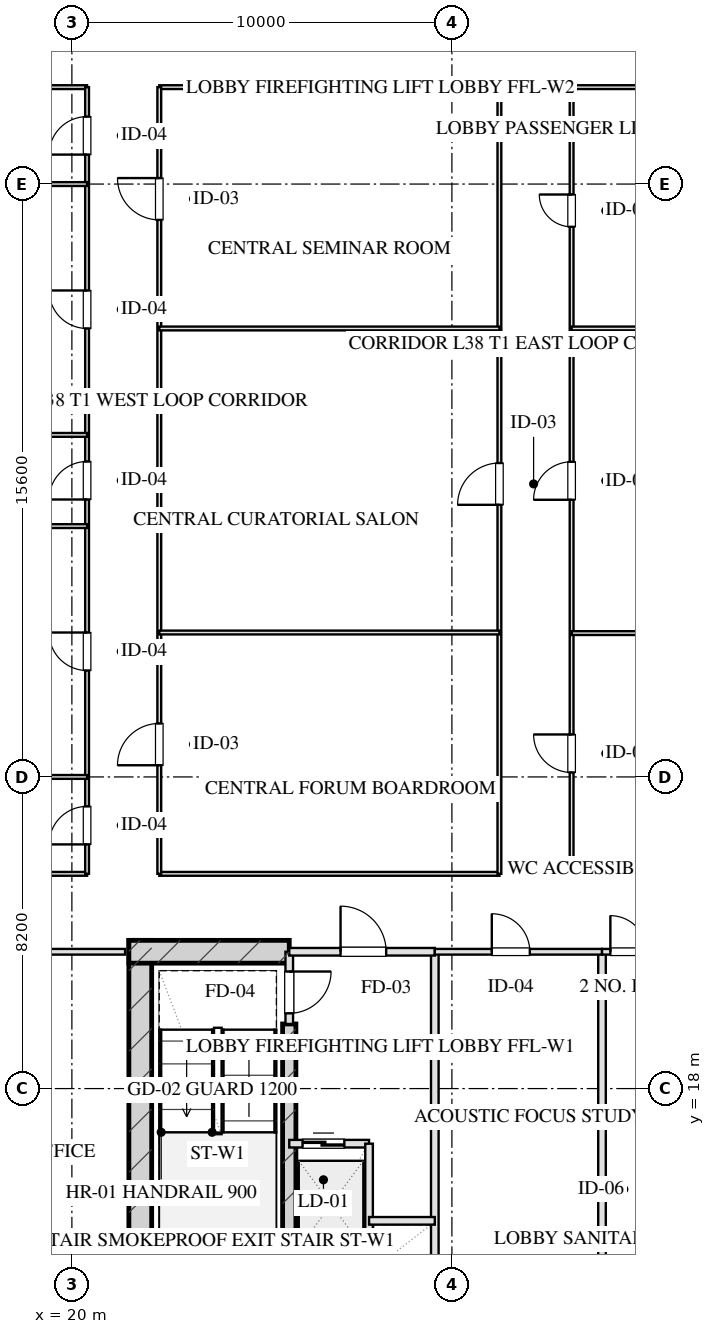
"""IFC4 building model, lengths in metres.
Left out: names, types, materials, properties, quantities, classifications, styles, units other than length and angle.
Written with IfcOpenShell. Run it as: python <this file> out.ifc"""

import sys

from ifc_helpers import new_model, si_unit, direction, frame, frame_2d, origin, place, context, subcontext, project, spatial, rectangle, extrude, element, fill, save


model = new_model("IFC4")
c1 = context("Model", 3, precision=1e-05, world=origin(), true_north=direction((0.0, 1.0)))
c2 = subcontext(c1, "Body", "Model", "MODEL_VIEW")
j1 = project(units=[si_unit("LENGTHUNIT", "METRE"), si_unit("PLANEANGLEUNIT", "RADIAN")], contexts=[c1])
p1 = place(None, origin())
s1 = spatial("IfcSite", under=j1, at=p1, CompositionType="ELEMENT")
p2 = place(p1, origin())
s2 = spatial("IfcBuilding", under=s1, at=p2, CompositionType="ELEMENT")
p3 = place(p2, frame((0.0, 0.0, 146.05)))
s3 = spatial("IfcBuildingStorey", under=s2, at=p3, CompositionType="ELEMENT", Elevation=146.05)
p4 = place(p3, frame((21.8, 21.9, 0.0), z_axis=(0.0, 0.0, 1.0), x_axis=(0.0, -1.0, 0.0)))
e1 = element("IfcWall", 1, at=p4, inside=s3, PredefinedType="SHEAR", context=c2, shape_type="SweptSolid", body=[
    extrude(rectangle(XDim=9.48, YDim=0.6, at=frame_2d((4.74, 0.0))), origin(), (0.0, 0.0, 1.0), 3.45),
])
p5 = place(p3, frame((25.72, 19.7, 0.0), z_axis=(0.0, 0.0, 1.0), x_axis=(0.0, -1.0, 0.0)))
e2 = element("IfcWall", 2, at=p5, inside=s3, PredefinedType="SHEAR", context=c2, shape_type="SweptSolid", body=[
    extrude(rectangle(XDim=6.98, YDim=0.35, at=frame_2d((3.49, 0.0))), origin(), (0.0, 0.0, 1.0), 3.45),
])
p6 = place(p3, frame((21.5, 21.6, 0.0), z_axis=(0.0, 0.0, 1.0), x_axis=(1.0, 0.0, 0.0)))
e3 = element("IfcWall", 3, at=p6, inside=s3, PredefinedType="SHEAR", context=c2, shape_type="SweptSolid", body=[
    extrude(rectangle(XDim=4.22, YDim=0.6, at=frame_2d((2.11, 0.0))), origin(), (0.0, 0.0, 1.0), 3.45),
])
p7 = place(p3, frame((25.72, 21.6, 0.0), z_axis=(0.0, 0.0, 1.0), x_axis=(0.0, -1.0, 0.0)))
e4 = element("IfcWall", 4, at=p7, inside=s3, PredefinedType="PARTITIONING", context=c2, shape_type="SweptSolid", body=[
    extrude(rectangle(XDim=1.9, YDim=0.2, at=frame_2d((0.95, 0.0))), origin(), (0.0, 0.0, 1.0), 3.175),
])
p8 = place(p7, frame((0.52, 0.0, 0.0)))
e5 = element("IfcOpeningElement", 5, at=p8, cuts=e4, PredefinedType="OPENING", context=c2, shape_type="SweptSolid", body=[
    extrude(rectangle(XDim=1.1, YDim=2.05, at=frame_2d((0.55, 1.025))), frame((0.0, 0.11, 0.0), z_axis=(0.0, -1.0, 0.0), x_axis=(1.0, 0.0, 0.0)), (0.0, 0.0, 1.0), 0.22),
])
p9 = place(p3, frame((29.55, 21.6, 0.0), z_axis=(0.0, 0.0, 1.0), x_axis=(0.0, -1.0, 0.0)))
e6 = element("IfcWall", 6, at=p9, inside=s3, PredefinedType="PARTITIONING", context=c2, shape_type="SweptSolid", body=[
    extrude(rectangle(XDim=8.43, YDim=0.2, at=frame_2d((4.215, 0.0))), origin(), (0.0, 0.0, 1.0), 3.175),
])
p10 = place(p3, frame((25.72, 21.6, 0.0), z_axis=(0.0, 0.0, 1.0), x_axis=(1.0, 0.0, 0.0)))
e7 = element("IfcWall", 7, at=p10, inside=s3, PredefinedType="PARTITIONING", context=c2, shape_type="SweptSolid", body=[
    extrude(rectangle(XDim=3.83, YDim=0.2, at=frame_2d((1.915, 0.0))), origin(), (0.0, 0.0, 1.0), 3.175),
])
p11 = place(p10, frame((1.35, 0.0, 0.0)))
e8 = element("IfcOpeningElement", 8, at=p11, cuts=e7, PredefinedType="OPENING", context=c2, shape_type="SweptSolid", body=[
    extrude(rectangle(XDim=1.2, YDim=2.05, at=frame_2d((0.6, 1.025))), frame((0.0, 0.11, 0.0), z_axis=(0.0, -1.0, 0.0), x_axis=(1.0, 0.0, 0.0)), (0.0, 0.0, 1.0), 0.22),
])
p12 = place(p3, frame((25.72, 16.55, 0.0), z_axis=(0.0, 0.0, 1.0), x_axis=(1.0, 0.0, 0.0)))
e9 = element("IfcWall", 9, at=p12, inside=s3, PredefinedType="PARTITIONING", context=c2, shape_type="SweptSolid", body=[
    extrude(rectangle(XDim=2.1, YDim=0.2, at=frame_2d((1.05, 0.0))), origin(), (0.0, 0.0, 1.0), 3.175),
])
p13 = place(p12, frame((0.35, 0.0, 0.0)))
e10 = element("IfcOpeningElement", 10, at=p13, cuts=e9, PredefinedType="OPENING", context=c2, shape_type="SweptSolid", body=[
    extrude(rectangle(XDim=1.1, YDim=2.05, at=frame_2d((0.55, 1.025))), frame((0.0, 0.11, 0.0), z_axis=(0.0, -1.0, 0.0), x_axis=(1.0, 0.0, 0.0)), (0.0, 0.0, 1.0), 0.22),
])
p14 = place(p3, frame((27.82, 16.55, 0.0), z_axis=(0.0, 0.0, 1.0), x_axis=(0.0, -1.0, 0.0)))
e11 = element("IfcWall", 11, at=p14, inside=s3, PredefinedType="PARTITIONING", context=c2, shape_type="SweptSolid", body=[
    extrude(rectangle(XDim=3.7, YDim=0.2, at=frame_2d((1.85, 0.0))), origin(), (0.0, 0.0, 1.0), 3.175),
])
p15 = place(p3, frame((27.82, 14.52, 0.0), z_axis=(0.0, 0.0, 1.0), x_axis=(1.0, 0.0, 0.0)))
e12 = element("IfcWall", 12, at=p15, inside=s3, PredefinedType="PARTITIONING", context=c2, shape_type="SweptSolid", body=[
    extrude(rectangle(XDim=1.73, YDim=0.2, at=frame_2d((0.865, 0.0))), origin(), (0.0, 0.0, 1.0), 3.175),
])
p16 = place(p3, frame((33.95, 21.6, 0.0), z_axis=(0.0, 0.0, 1.0), x_axis=(0.0, -1.0, 0.0)))
e13 = element("IfcWall", 13, at=p16, inside=s3, PredefinedType="PARTITIONING", context=c2, shape_type="SweptSolid", body=[
    extrude(rectangle(XDim=8.43, YDim=0.2, at=frame_2d((4.215, 0.0))), origin(), (0.0, 0.0, 1.0), 3.175),
])
p17 = place(p3, frame((29.55, 21.6, 0.0), z_axis=(0.0, 0.0, 1.0), x_axis=(1.0, 0.0, 0.0)))
e14 = element("IfcWall", 14, at=p17, inside=s3, PredefinedType="PARTITIONING", context=c2, shape_type="SweptSolid", body=[
    extrude(rectangle(XDim=4.4, YDim=0.15, at=frame_2d((2.2, 0.0))), origin(), (0.0, 0.0, 1.0), 3.175),
])
p18 = place(p17, frame((1.5, 0.0, 0.0)))
e15 = element("IfcOpeningElement", 15, at=p18, cuts=e14, PredefinedType="OPENING", context=c2, shape_type="SweptSolid", body=[
    extrude(rectangle(XDim=1.0, YDim=2.05, at=frame_2d((0.5, 1.025))), frame((0.0, 0.085, 0.0), z_axis=(0.0, -1.0, 0.0), x_axis=(1.0, 0.0, 0.0)), (0.0, 0.0, 1.0), 0.17),
])
p19 = place(p3, frame((29.55, 17.3, 0.0), z_axis=(0.0, 0.0, 1.0), x_axis=(1.0, 0.0, 0.0)))
e16 = element("IfcWall", 16, at=p19, inside=s3, PredefinedType="PARTITIONING", context=c2, shape_type="SweptSolid", body=[
    extrude(rectangle(XDim=4.4, YDim=0.15, at=frame_2d((2.2, 0.0))), origin(), (0.0, 0.0, 1.0), 3.175),
])
p20 = place(p3, frame((33.95, 21.6, 0.0), z_axis=(0.0, 0.0, 1.0), x_axis=(1.0, 0.0, 0.0)))
e17 = element("IfcWall", 17, at=p20, inside=s3, PredefinedType="PARTITIONING", context=c2, shape_type="SweptSolid", body=[
    extrude(rectangle(XDim=3.8, YDim=0.15, at=frame_2d((1.9, 0.0))), origin(), (0.0, 0.0, 1.0), 3.175),
])
p21 = place(p20, frame((0.22, 0.0, 0.0)))
e18 = element("IfcOpeningElement", 18, at=p21, cuts=e17, PredefinedType="OPENING", context=c2, shape_type="SweptSolid", body=[
    extrude(rectangle(XDim=0.95, YDim=2.05, at=frame_2d((0.475, 1.025))), frame((0.0, 0.085, 0.0), z_axis=(0.0, -1.0, 0.0), x_axis=(1.0, 0.0, 0.0)), (0.0, 0.0, 1.0), 0.17),
])
p22 = place(p3, frame((11.4, 21.6, 0.0), z_axis=(0.0, 0.0, 1.0), x_axis=(1.0, 0.0, 0.0)))
e19 = element("IfcWall", 19, at=p22, inside=s3, PredefinedType="PARTITIONING", context=c2, shape_type="SweptSolid", body=[
    extrude(rectangle(XDim=10.0, YDim=0.15, at=frame_2d((5.0, 0.0))), origin(), (0.0, 0.0, 1.0), 3.175),
])
p23 = place(p22, frame((4.2, 0.0, 0.0)))
e20 = element("IfcOpeningElement", 20, at=p23, cuts=e19, PredefinedType="OPENING", context=c2, shape_type="SweptSolid", body=[
    extrude(rectangle(XDim=1.0, YDim=2.05, at=frame_2d((0.5, 1.025))), frame((0.0, 0.085, 0.0), z_axis=(0.0, -1.0, 0.0), x_axis=(1.0, 0.0, 0.0)), (0.0, 0.0, 1.0), 0.17),
])
p24 = place(p3, frame((11.4, 23.65, 0.0), z_axis=(0.0, 0.0, 1.0), x_axis=(1.0, 0.0, 0.0)))
e21 = element("IfcWall", 21, at=p24, inside=s3, PredefinedType="MOVABLE", context=c2, shape_type="SweptSolid", body=[
    extrude(rectangle(XDim=9.0, YDim=0.1, at=frame_2d((4.5, 0.0))), origin(), (0.0, 0.0, 1.0), 3.175),
])
p25 = place(p3, frame((22.3, 23.65, 0.0), z_axis=(0.0, 0.0, 1.0), x_axis=(1.0, 0.0, 0.0)))
e22 = element("IfcWall", 22, at=p25, inside=s3, PredefinedType="MOVABLE", context=c2, shape_type="SweptSolid", body=[
    extrude(rectangle(XDim=8.95, YDim=0.1, at=frame_2d((4.475, 0.0))), origin(), (0.0, 0.0, 1.0), 3.175),
])
p26 = place(p3, frame((33.15, 23.65, 0.0), z_axis=(0.0, 0.0, 1.0), x_axis=(1.0, 0.0, 0.0)))
e23 = element("IfcWall", 23, at=p26, inside=s3, PredefinedType="MOVABLE", context=c2, shape_type="SweptSolid", body=[
    extrude(rectangle(XDim=15.45, YDim=0.1, at=frame_2d((7.725, 0.0))), origin(), (0.0, 0.0, 1.0), 3.175),
])
p27 = place(p3, frame((11.4, 44.35, 0.0), z_axis=(0.0, 0.0, 1.0), x_axis=(1.0, 0.0, 0.0)))
e24 = element("IfcWall", 24, at=p27, inside=s3, PredefinedType="MOVABLE", context=c2, shape_type="SweptSolid", body=[
    extrude(rectangle(XDim=9.0, YDim=0.1, at=frame_2d((4.5, 0.0))), origin(), (0.0, 0.0, 1.0), 3.175),
])
p28 = place(p3, frame((22.3, 44.35, 0.0), z_axis=(0.0, 0.0, 1.0), x_axis=(1.0, 0.0, 0.0)))
e25 = element("IfcWall", 25, at=p28, inside=s3, PredefinedType="MOVABLE", context=c2, shape_type="SweptSolid", body=[
    extrude(rectangle(XDim=8.95, YDim=0.1, at=frame_2d((4.475, 0.0))), origin(), (0.0, 0.0, 1.0), 3.175),
])
p29 = place(p3, frame((33.15, 44.35, 0.0), z_axis=(0.0, 0.0, 1.0), x_axis=(1.0, 0.0, 0.0)))
e26 = element("IfcWall", 26, at=p29, inside=s3, PredefinedType="MOVABLE", context=c2, shape_type="SweptSolid", body=[
    extrude(rectangle(XDim=15.45, YDim=0.1, at=frame_2d((7.725, 0.0))), origin(), (0.0, 0.0, 1.0), 3.175),
])
p30 = place(p3, frame((20.4, 23.65, 0.0), z_axis=(0.0, 0.0, 1.0), x_axis=(0.0, 1.0, 0.0)))
e27 = element("IfcWall", 27, at=p30, inside=s3, PredefinedType="MOVABLE", context=c2, shape_type="SweptSolid", body=[
    extrude(rectangle(XDim=20.7, YDim=0.1, at=frame_2d((10.35, 0.0))), origin(), (0.0, 0.0, 1.0), 3.175),
])
p31 = place(p30, frame((0.775, 0.0, 0.0)))
e28 = element("IfcOpeningElement", 28, at=p31, cuts=e27, PredefinedType="OPENING", context=c2, shape_type="SweptSolid", body=[
    extrude(rectangle(XDim=1.0, YDim=2.05, at=frame_2d((0.5, 1.025))), frame((0.0, 0.06, 0.0), z_axis=(0.0, -1.0, 0.0), x_axis=(1.0, 0.0, 0.0)), (0.0, 0.0, 1.0), 0.12),
])
p32 = place(p30, frame((5.35, 0.0, 0.0)))
e29 = element("IfcOpeningElement", 29, at=p32, cuts=e27, PredefinedType="OPENING", context=c2, shape_type="SweptSolid", body=[
    extrude(rectangle(XDim=1.0, YDim=2.05, at=frame_2d((0.5, 1.025))), frame((0.0, 0.06, 0.0), z_axis=(0.0, -1.0, 0.0), x_axis=(1.0, 0.0, 0.0)), (0.0, 0.0, 1.0), 0.12),
])
p33 = place(p30, frame((9.85, 0.0, 0.0)))
e30 = element("IfcOpeningElement", 30, at=p33, cuts=e27, PredefinedType="OPENING", context=c2, shape_type="SweptSolid", body=[
    extrude(rectangle(XDim=1.0, YDim=2.05, at=frame_2d((0.5, 1.025))), frame((0.0, 0.06, 0.0), z_axis=(0.0, -1.0, 0.0), x_axis=(1.0, 0.0, 0.0)), (0.0, 0.0, 1.0), 0.12),
])
p34 = place(p30, frame((14.35, 0.0, 0.0)))
e31 = element("IfcOpeningElement", 31, at=p34, cuts=e27, PredefinedType="OPENING", context=c2, shape_type="SweptSolid", body=[
    extrude(rectangle(XDim=1.0, YDim=2.05, at=frame_2d((0.5, 1.025))), frame((0.0, 0.06, 0.0), z_axis=(0.0, -1.0, 0.0), x_axis=(1.0, 0.0, 0.0)), (0.0, 0.0, 1.0), 0.12),
])
p35 = place(p30, frame((18.925, 0.0, 0.0)))
e32 = element("IfcOpeningElement", 32, at=p35, cuts=e27, PredefinedType="OPENING", context=c2, shape_type="SweptSolid", body=[
    extrude(rectangle(XDim=1.0, YDim=2.05, at=frame_2d((0.5, 1.025))), frame((0.0, 0.06, 0.0), z_axis=(0.0, -1.0, 0.0), x_axis=(1.0, 0.0, 0.0)), (0.0, 0.0, 1.0), 0.12),
])
p36 = place(p3, frame((22.3, 23.65, 0.0), z_axis=(0.0, 0.0, 1.0), x_axis=(0.0, 1.0, 0.0)))
e33 = element("IfcWall", 33, at=p36, inside=s3, PredefinedType="MOVABLE", context=c2, shape_type="SweptSolid", body=[
    extrude(rectangle(XDim=20.7, YDim=0.1, at=frame_2d((10.35, 0.0))), origin(), (0.0, 0.0, 1.0), 3.175),
])
p37 = place(p36, frame((2.857, 0.0, 0.0)))
e34 = element("IfcOpeningElement", 34, at=p37, cuts=e33, PredefinedType="OPENING", context=c2, shape_type="SweptSolid", body=[
    extrude(rectangle(XDim=1.1, YDim=2.05, at=frame_2d((0.55, 1.025))), frame((0.0, 0.06, 0.0), z_axis=(0.0, -1.0, 0.0), x_axis=(1.0, 0.0, 0.0)), (0.0, 0.0, 1.0), 0.12),
])
p38 = place(p36, frame((17.208, 0.0, 0.0)))
e35 = element("IfcOpeningElement", 35, at=p38, cuts=e33, PredefinedType="OPENING", context=c2, shape_type="SweptSolid", body=[
    extrude(rectangle(XDim=1.1, YDim=2.05, at=frame_2d((0.55, 1.025))), frame((0.0, 0.06, 0.0), z_axis=(0.0, -1.0, 0.0), x_axis=(1.0, 0.0, 0.0)), (0.0, 0.0, 1.0), 0.12),
])
p39 = place(p3, frame((31.25, 23.65, 0.0), z_axis=(0.0, 0.0, 1.0), x_axis=(0.0, 1.0, 0.0)))
e36 = element("IfcWall", 36, at=p39, inside=s3, PredefinedType="MOVABLE", context=c2, shape_type="SweptSolid", body=[
    extrude(rectangle(XDim=20.7, YDim=0.1, at=frame_2d((10.35, 0.0))), origin(), (0.0, 0.0, 1.0), 3.175),
])
p40 = place(p39, frame((9.71, 0.0, 0.0)))
e37 = element("IfcOpeningElement", 37, at=p40, cuts=e36, PredefinedType="OPENING", context=c2, shape_type="SweptSolid", body=[
    extrude(rectangle(XDim=1.1, YDim=2.05, at=frame_2d((0.55, 1.025))), frame((0.0, 0.06, 0.0), z_axis=(0.0, -1.0, 0.0), x_axis=(1.0, 0.0, 0.0)), (0.0, 0.0, 1.0), 0.12),
])
p41 = place(p3, frame((33.15, 23.65, 0.0), z_axis=(0.0, 0.0, 1.0), x_axis=(0.0, 1.0, 0.0)))
e38 = element("IfcWall", 38, at=p41, inside=s3, PredefinedType="MOVABLE", context=c2, shape_type="SweptSolid", body=[
    extrude(rectangle(XDim=20.7, YDim=0.1, at=frame_2d((10.35, 0.0))), origin(), (0.0, 0.0, 1.0), 3.175),
])
p42 = place(p41, frame((2.667, 0.0, 0.0)))
e39 = element("IfcOpeningElement", 39, at=p42, cuts=e38, PredefinedType="OPENING", context=c2, shape_type="SweptSolid", body=[
    extrude(rectangle(XDim=1.0, YDim=2.05, at=frame_2d((0.5, 1.025))), frame((0.0, 0.06, 0.0), z_axis=(0.0, -1.0, 0.0), x_axis=(1.0, 0.0, 0.0)), (0.0, 0.0, 1.0), 0.12),
])
p43 = place(p41, frame((9.843, 0.0, 0.0)))
e40 = element("IfcOpeningElement", 40, at=p43, cuts=e38, PredefinedType="OPENING", context=c2, shape_type="SweptSolid", body=[
    extrude(rectangle(XDim=1.0, YDim=2.05, at=frame_2d((0.5, 1.025))), frame((0.0, 0.06, 0.0), z_axis=(0.0, -1.0, 0.0), x_axis=(1.0, 0.0, 0.0)), (0.0, 0.0, 1.0), 0.12),
])
p44 = place(p41, frame((17.025, 0.0, 0.0)))
e41 = element("IfcOpeningElement", 41, at=p44, cuts=e38, PredefinedType="OPENING", context=c2, shape_type="SweptSolid", body=[
    extrude(rectangle(XDim=0.85, YDim=2.05, at=frame_2d((0.425, 1.025))), frame((0.0, 0.06, 0.0), z_axis=(0.0, -1.0, 0.0), x_axis=(1.0, 0.0, 0.0)), (0.0, 0.0, 1.0), 0.12),
])
for number, where, z_axis, x_axis in (
    (42, (22.3, 30.0, 0.0), (0.0, 0.0, 1.0), (1.0, 0.0, 0.0)),
    (43, (22.3, 38.0, 0.0), (0.0, 0.0, 1.0), (1.0, 0.0, 0.0)),
):
    element("IfcWall", number, at=place(p3, frame(where, z_axis=z_axis, x_axis=x_axis)), inside=s3, PredefinedType="MOVABLE", context=c2, shape_type="SweptSolid", body=[
        extrude(rectangle(XDim=8.95, YDim=0.1, at=frame_2d((4.475, 0.0))), origin(), (0.0, 0.0, 1.0), 3.175),
    ])
for number, where, z_axis, x_axis in (
    (44, (11.4, 26.2, 0.0), (0.0, 0.0, 1.0), (1.0, 0.0, 0.0)),
    (45, (11.4, 32.8, 0.0), (0.0, 0.0, 1.0), (1.0, 0.0, 0.0)),
    (46, (11.4, 35.2, 0.0), (0.0, 0.0, 1.0), (1.0, 0.0, 0.0)),
    (47, (11.4, 41.8, 0.0), (0.0, 0.0, 1.0), (1.0, 0.0, 0.0)),
):
    element("IfcWall", number, at=place(p3, frame(where, z_axis=z_axis, x_axis=x_axis)), inside=s3, PredefinedType="MOVABLE", context=c2, shape_type="SweptSolid", body=[
        extrude(rectangle(XDim=9.0, YDim=0.1, at=frame_2d((4.5, 0.0))), origin(), (0.0, 0.0, 1.0), 3.175),
    ])
for number, where, z_axis, x_axis in (
    (48, (33.15, 29.985, 0.0), (0.0, 0.0, 1.0), (1.0, 0.0, 0.0)),
    (49, (33.15, 38.0, 0.0), (0.0, 0.0, 1.0), (1.0, 0.0, 0.0)),
):
    element("IfcWall", number, at=place(p3, frame(where, z_axis=z_axis, x_axis=x_axis)), inside=s3, PredefinedType="MOVABLE", context=c2, shape_type="SweptSolid", body=[
        extrude(rectangle(XDim=15.45, YDim=0.1, at=frame_2d((7.725, 0.0))), origin(), (0.0, 0.0, 1.0), 3.175),
    ])
p45 = place(p8, origin())
e50 = element("IfcDoor", 50, at=p45, inside=s3, OperationType="SINGLE_SWING_LEFT", PredefinedType="DOOR", context=c2, shape_type="SweptSolid", body=[
    extrude(rectangle(XDim=1.1, YDim=2.05, at=frame_2d((0.55, 1.025))), frame((0.0, 0.025, 0.0), z_axis=(0.0, -1.0, 0.0), x_axis=(1.0, 0.0, 0.0)), (0.0, 0.0, 1.0), 0.05),
])
fill(e5, e50)
p46 = place(p11, origin())
e51 = element("IfcDoor", 51, at=p46, inside=s3, OperationType="SINGLE_SWING_LEFT", PredefinedType="DOOR", context=c2, shape_type="SweptSolid", body=[
    extrude(rectangle(XDim=1.2, YDim=2.05, at=frame_2d((0.6, 1.025))), frame((0.0, 0.025, 0.0), z_axis=(0.0, -1.0, 0.0), x_axis=(1.0, 0.0, 0.0)), (0.0, 0.0, 1.0), 0.05),
])
fill(e8, e51)
p47 = place(p13, origin())
e52 = element("IfcDoor", 52, at=p47, inside=s3, OperationType="DOUBLE_DOOR_SLIDING", PredefinedType="DOOR", context=c2, shape_type="SweptSolid", body=[
    extrude(rectangle(XDim=1.1, YDim=2.05, at=frame_2d((0.55, 1.025))), frame((0.0, 0.025, 0.0), z_axis=(0.0, -1.0, 0.0), x_axis=(1.0, 0.0, 0.0)), (0.0, 0.0, 1.0), 0.05),
])
fill(e10, e52)
p48 = place(p18, origin())
e53 = element("IfcDoor", 53, at=p48, inside=s3, OperationType="SINGLE_SWING_LEFT", PredefinedType="DOOR", context=c2, shape_type="SweptSolid", body=[
    extrude(rectangle(XDim=1.0, YDim=2.05, at=frame_2d((0.5, 1.025))), frame((0.0, 0.025, 0.0), z_axis=(0.0, -1.0, 0.0), x_axis=(1.0, 0.0, 0.0)), (0.0, 0.0, 1.0), 0.05),
])
fill(e15, e53)
p49 = place(p21, origin())
e54 = element("IfcDoor", 54, at=p49, inside=s3, OperationType="SINGLE_SWING_LEFT", PredefinedType="DOOR", context=c2, shape_type="SweptSolid", body=[
    extrude(rectangle(XDim=0.95, YDim=2.05, at=frame_2d((0.475, 1.025))), frame((0.0, 0.025, 0.0), z_axis=(0.0, -1.0, 0.0), x_axis=(1.0, 0.0, 0.0)), (0.0, 0.0, 1.0), 0.05),
])
fill(e18, e54)
p50 = place(p31, origin())
e55 = element("IfcDoor", 55, at=p50, inside=s3, OperationType="SINGLE_SWING_LEFT", PredefinedType="DOOR", context=c2, shape_type="SweptSolid", body=[
    extrude(rectangle(XDim=1.0, YDim=2.05, at=frame_2d((0.5, 1.025))), frame((0.0, 0.025, 0.0), z_axis=(0.0, -1.0, 0.0), x_axis=(1.0, 0.0, 0.0)), (0.0, 0.0, 1.0), 0.05),
])
fill(e28, e55)
p51 = place(p32, origin())
e56 = element("IfcDoor", 56, at=p51, inside=s3, OperationType="SINGLE_SWING_RIGHT", PredefinedType="DOOR", context=c2, shape_type="SweptSolid", body=[
    extrude(rectangle(XDim=1.0, YDim=2.05, at=frame_2d((0.5, 1.025))), frame((0.0, 0.025, 0.0), z_axis=(0.0, -1.0, 0.0), x_axis=(1.0, 0.0, 0.0)), (0.0, 0.0, 1.0), 0.05),
])
fill(e29, e56)
p52 = place(p33, origin())
e57 = element("IfcDoor", 57, at=p52, inside=s3, OperationType="SINGLE_SWING_LEFT", PredefinedType="DOOR", context=c2, shape_type="SweptSolid", body=[
    extrude(rectangle(XDim=1.0, YDim=2.05, at=frame_2d((0.5, 1.025))), frame((0.0, 0.025, 0.0), z_axis=(0.0, -1.0, 0.0), x_axis=(1.0, 0.0, 0.0)), (0.0, 0.0, 1.0), 0.05),
])
fill(e30, e57)
p53 = place(p34, origin())
e58 = element("IfcDoor", 58, at=p53, inside=s3, OperationType="SINGLE_SWING_RIGHT", PredefinedType="DOOR", context=c2, shape_type="SweptSolid", body=[
    extrude(rectangle(XDim=1.0, YDim=2.05, at=frame_2d((0.5, 1.025))), frame((0.0, 0.025, 0.0), z_axis=(0.0, -1.0, 0.0), x_axis=(1.0, 0.0, 0.0)), (0.0, 0.0, 1.0), 0.05),
])
fill(e31, e58)
p54 = place(p35, origin())
e59 = element("IfcDoor", 59, at=p54, inside=s3, OperationType="SINGLE_SWING_LEFT", PredefinedType="DOOR", context=c2, shape_type="SweptSolid", body=[
    extrude(rectangle(XDim=1.0, YDim=2.05, at=frame_2d((0.5, 1.025))), frame((0.0, 0.025, 0.0), z_axis=(0.0, -1.0, 0.0), x_axis=(1.0, 0.0, 0.0)), (0.0, 0.0, 1.0), 0.05),
])
fill(e32, e59)
p55 = place(p37, origin())
e60 = element("IfcDoor", 60, at=p55, inside=s3, OperationType="SINGLE_SWING_LEFT", PredefinedType="DOOR", context=c2, shape_type="SweptSolid", body=[
    extrude(rectangle(XDim=1.1, YDim=2.05, at=frame_2d((0.55, 1.025))), frame((0.0, 0.025, 0.0), z_axis=(0.0, -1.0, 0.0), x_axis=(1.0, 0.0, 0.0)), (0.0, 0.0, 1.0), 0.05),
])
fill(e34, e60)
p56 = place(p38, origin())
e61 = element("IfcDoor", 61, at=p56, inside=s3, OperationType="SINGLE_SWING_RIGHT", PredefinedType="DOOR", context=c2, shape_type="SweptSolid", body=[
    extrude(rectangle(XDim=1.1, YDim=2.05, at=frame_2d((0.55, 1.025))), frame((0.0, 0.025, 0.0), z_axis=(0.0, -1.0, 0.0), x_axis=(1.0, 0.0, 0.0)), (0.0, 0.0, 1.0), 0.05),
])
fill(e35, e61)
p57 = place(p40, origin())
e62 = element("IfcDoor", 62, at=p57, inside=s3, OperationType="SINGLE_SWING_LEFT", PredefinedType="DOOR", context=c2, shape_type="SweptSolid", body=[
    extrude(rectangle(XDim=1.1, YDim=2.05, at=frame_2d((0.55, 1.025))), frame((0.0, 0.025, 0.0), z_axis=(0.0, -1.0, 0.0), x_axis=(1.0, 0.0, 0.0)), (0.0, 0.0, 1.0), 0.05),
])
fill(e37, e62)
p58 = place(p42, origin())
e63 = element("IfcDoor", 63, at=p58, inside=s3, OperationType="SINGLE_SWING_RIGHT", PredefinedType="DOOR", context=c2, shape_type="SweptSolid", body=[
    extrude(rectangle(XDim=1.0, YDim=2.05, at=frame_2d((0.5, 1.025))), frame((0.0, 0.025, 0.0), z_axis=(0.0, -1.0, 0.0), x_axis=(1.0, 0.0, 0.0)), (0.0, 0.0, 1.0), 0.05),
])
fill(e39, e63)
p59 = place(p43, origin())
e64 = element("IfcDoor", 64, at=p59, inside=s3, OperationType="SINGLE_SWING_LEFT", PredefinedType="DOOR", context=c2, shape_type="SweptSolid", body=[
    extrude(rectangle(XDim=1.0, YDim=2.05, at=frame_2d((0.5, 1.025))), frame((0.0, 0.025, 0.0), z_axis=(0.0, -1.0, 0.0), x_axis=(1.0, 0.0, 0.0)), (0.0, 0.0, 1.0), 0.05),
])
fill(e40, e64)
p60 = place(p44, origin())
e65 = element("IfcDoor", 65, at=p60, inside=s3, OperationType="SINGLE_SWING_RIGHT", PredefinedType="DOOR", context=c2, shape_type="SweptSolid", body=[
    extrude(rectangle(XDim=0.85, YDim=2.05, at=frame_2d((0.425, 1.025))), frame((0.0, 0.025, 0.0), z_axis=(0.0, -1.0, 0.0), x_axis=(1.0, 0.0, 0.0)), (0.0, 0.0, 1.0), 0.05),
])
fill(e41, e65)
save(model, sys.argv[1])
